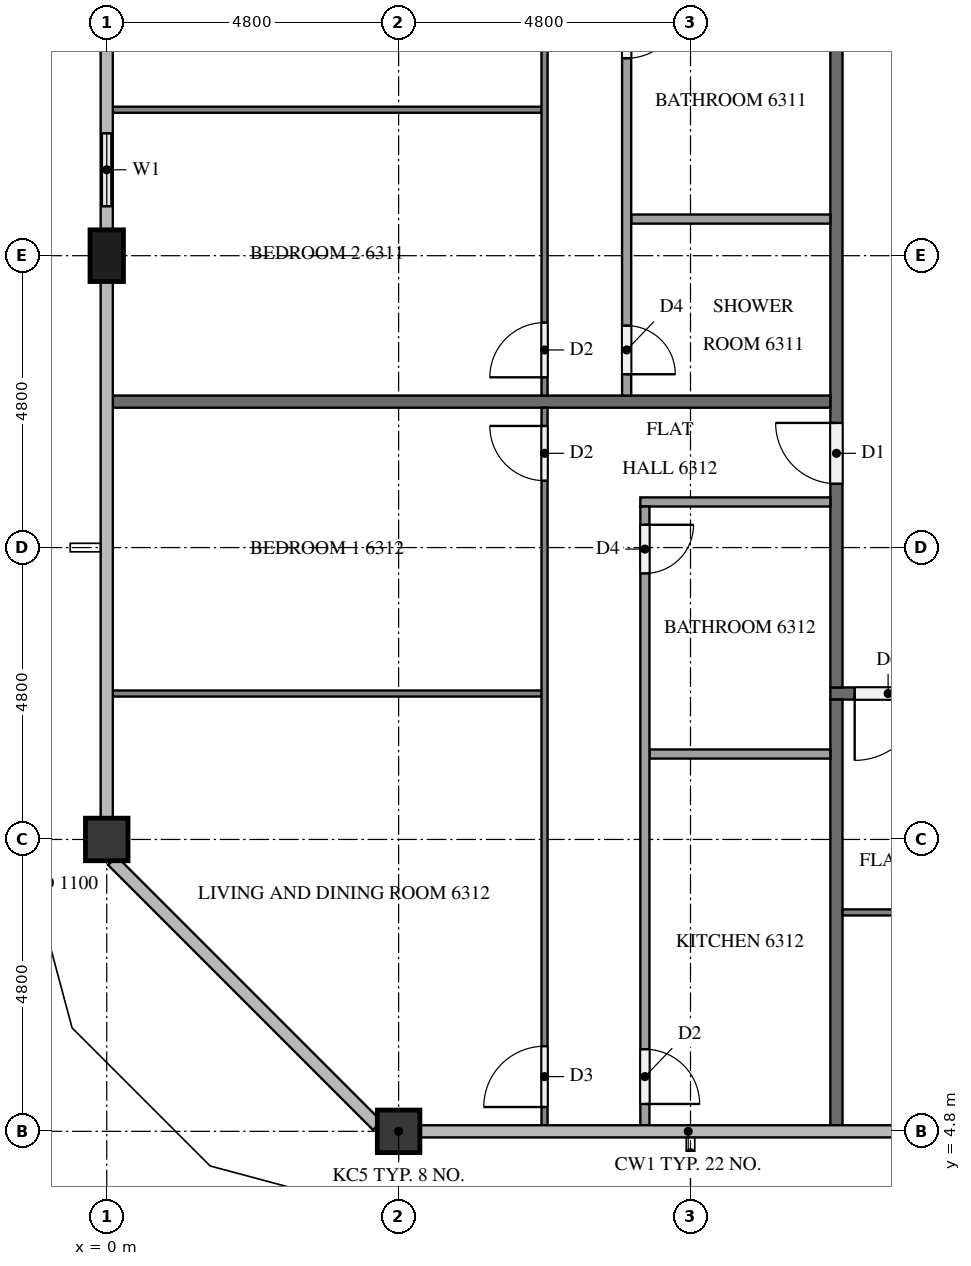
"""IFC4 building model, lengths in metres.
Left out: names, types, materials, properties, quantities, classifications, styles, units other than length and angle.
Written with IfcOpenShell. Run it as: python <this file> out.ifc"""

import sys

from ifc_helpers import new_model, si_unit, direction, frame, frame_2d, origin, origin_2d, place, context, subcontext, project, spatial, rectangle, extrude, element, fill, save


model = new_model("IFC4")
c1 = context("Model", 3, precision=1e-05, world=origin(), true_north=direction((0.0, 1.0)))
c2 = subcontext(c1, "Body", "Model", "MODEL_VIEW")
j1 = project(units=[si_unit("LENGTHUNIT", "METRE"), si_unit("PLANEANGLEUNIT", "RADIAN")], contexts=[c1])
p1 = place(None, origin())
s1 = spatial("IfcSite", under=j1, at=p1, CompositionType="ELEMENT")
p2 = place(p1, origin())
s2 = spatial("IfcBuilding", under=s1, at=p2, CompositionType="ELEMENT")
p3 = place(p2, frame((0.0, 0.0, 242.2)))
s3 = spatial("IfcBuildingStorey", under=s2, at=p3, CompositionType="ELEMENT", Elevation=242.2)
p4 = place(p3, frame((4.8, 4.8, 0.0), z_axis=(0.0, 0.0, 1.0), x_axis=(1.0, 0.0, 0.0)))
e1 = element("IfcColumn", 1, at=p4, inside=s3, PredefinedType="COLUMN", context=c2, shape_type="SweptSolid", body=[
    extrude(rectangle(XDim=0.7, YDim=0.7, at=origin_2d()), origin(), (0.0, 0.0, 1.0), 3.2),
])
p5 = place(p3, frame((0.0, 19.2, 0.0), z_axis=(0.0, 0.0, 1.0), x_axis=(0.0, 1.0, 0.0)))
e2 = element("IfcColumn", 2, at=p5, inside=s3, PredefinedType="COLUMN", context=c2, shape_type="SweptSolid", body=[
    extrude(rectangle(XDim=0.85, YDim=0.55, at=origin_2d()), origin(), (0.0, 0.0, 1.0), 3.2),
])
p6 = place(p3, frame((0.0, 9.6, 0.0), z_axis=(0.0, 0.0, 1.0), x_axis=(1.0, 0.0, 0.0)))
e3 = element("IfcColumn", 3, at=p6, inside=s3, PredefinedType="COLUMN", context=c2, shape_type="SweptSolid", body=[
    extrude(rectangle(XDim=0.7, YDim=0.7, at=origin_2d()), origin(), (0.0, 0.0, 1.0), 3.2),
])
p7 = place(p3, frame((0.0, 21.6, 0.0), z_axis=(0.0, 0.0, 1.0), x_axis=(0.0, -1.0, 0.0)))
e4 = element("IfcWall", 4, at=p7, inside=s3, PredefinedType="SOLIDWALL", context=c2, shape_type="SweptSolid", body=[
    extrude(rectangle(XDim=1.975, YDim=0.15, at=frame_2d((0.988, 0.0))), origin(), (0.0, 0.0, 1.0), 3.2),
])
p8 = place(p7, frame((0.387, 0.0, 0.9)))
e5 = element("IfcOpeningElement", 5, at=p8, cuts=e4, PredefinedType="OPENING", context=c2, shape_type="SweptSolid", body=[
    extrude(rectangle(XDim=1.2, YDim=1.4, at=frame_2d((0.6, 0.7))), frame((0.0, 0.085, 0.0), z_axis=(0.0, -1.0, 0.0), x_axis=(1.0, 0.0, 0.0)), (0.0, 0.0, 1.0), 0.17),
])
p9 = place(p3, frame((50.5, 12.0, 0.0), z_axis=(0.0, 0.0, 1.0), x_axis=(-1.0, 0.0, 0.0)))
e6 = element("IfcWall", 6, at=p9, inside=s3, PredefinedType="PARTITIONING", context=c2, shape_type="SweptSolid", body=[
    extrude(rectangle(XDim=38.6, YDim=0.2, at=frame_2d((19.3, 0.0))), origin(), (0.0, 0.0, 1.0), 3.2),
])
p10 = place(p9, frame((37.1, 0.0, 0.0)))
e7 = element("IfcOpeningElement", 7, at=p10, cuts=e6, PredefinedType="OPENING", context=c2, shape_type="SweptSolid", body=[
    extrude(rectangle(XDim=1.1, YDim=2.1, at=frame_2d((0.55, 1.05))), frame((0.0, 0.11, 0.0), z_axis=(0.0, -1.0, 0.0), x_axis=(1.0, 0.0, 0.0)), (0.0, 0.0, 1.0), 0.22),
])
p11 = place(p9, frame((17.95, 0.0, 0.0)))
e8 = element("IfcOpeningElement", 8, at=p11, cuts=e6, PredefinedType="OPENING", context=c2, shape_type="SweptSolid", body=[
    extrude(rectangle(XDim=1.0, YDim=2.1, at=frame_2d((0.5, 1.05))), frame((0.0, 0.11, 0.0), z_axis=(0.0, -1.0, 0.0), x_axis=(1.0, 0.0, 0.0)), (0.0, 0.0, 1.0), 0.22),
])
p12 = place(p9, frame((8.35, 0.0, 0.0)))
e9 = element("IfcOpeningElement", 9, at=p12, cuts=e6, PredefinedType="OPENING", context=c2, shape_type="SweptSolid", body=[
    extrude(rectangle(XDim=1.0, YDim=2.1, at=frame_2d((0.5, 1.05))), frame((0.0, 0.11, 0.0), z_axis=(0.0, -1.0, 0.0), x_axis=(1.0, 0.0, 0.0)), (0.0, 0.0, 1.0), 0.22),
])
p13 = place(p3, frame((12.0, 12.1, 0.0), z_axis=(0.0, 0.0, 1.0), x_axis=(0.0, 1.0, 0.0)))
e10 = element("IfcWall", 10, at=p13, inside=s3, PredefinedType="PARTITIONING", context=c2, shape_type="SweptSolid", body=[
    extrude(rectangle(XDim=28.6, YDim=0.2, at=frame_2d((14.3, 0.0))), origin(), (0.0, 0.0, 1.0), 3.2),
])
p14 = place(p13, frame((27.35, 0.0, 0.0)))
e11 = element("IfcOpeningElement", 11, at=p14, cuts=e10, PredefinedType="OPENING", context=c2, shape_type="SweptSolid", body=[
    extrude(rectangle(XDim=1.0, YDim=2.1, at=frame_2d((0.5, 1.05))), frame((0.0, 0.11, 0.0), z_axis=(0.0, -1.0, 0.0), x_axis=(1.0, 0.0, 0.0)), (0.0, 0.0, 1.0), 0.22),
])
p15 = place(p13, frame((17.75, 0.0, 0.0)))
e12 = element("IfcOpeningElement", 12, at=p15, cuts=e10, PredefinedType="OPENING", context=c2, shape_type="SweptSolid", body=[
    extrude(rectangle(XDim=1.0, YDim=2.1, at=frame_2d((0.5, 1.05))), frame((0.0, 0.11, 0.0), z_axis=(0.0, -1.0, 0.0), x_axis=(1.0, 0.0, 0.0)), (0.0, 0.0, 1.0), 0.22),
])
p16 = place(p13, frame((3.35, 0.0, 0.0)))
e13 = element("IfcOpeningElement", 13, at=p16, cuts=e10, PredefinedType="OPENING", context=c2, shape_type="SweptSolid", body=[
    extrude(rectangle(XDim=1.0, YDim=2.1, at=frame_2d((0.5, 1.05))), frame((0.0, 0.11, 0.0), z_axis=(0.0, -1.0, 0.0), x_axis=(1.0, 0.0, 0.0)), (0.0, 0.0, 1.0), 0.22),
])
p17 = place(p3, frame((12.0, 4.9, 0.0), z_axis=(0.0, 0.0, 1.0), x_axis=(0.0, 1.0, 0.0)))
e14 = element("IfcWall", 14, at=p17, inside=s3, PredefinedType="PARTITIONING", context=c2, shape_type="SweptSolid", body=[
    extrude(rectangle(XDim=7.0, YDim=0.2, at=frame_2d((3.5, 0.0))), origin(), (0.0, 0.0, 1.0), 3.2),
])
p18 = place(p3, frame((0.1, 16.8, 0.0), z_axis=(0.0, 0.0, 1.0), x_axis=(1.0, 0.0, 0.0)))
e15 = element("IfcWall", 15, at=p18, inside=s3, PredefinedType="PARTITIONING", context=c2, shape_type="SweptSolid", body=[
    extrude(rectangle(XDim=11.8, YDim=0.2, at=frame_2d((5.9, 0.0))), origin(), (0.0, 0.0, 1.0), 3.2),
])
p19 = place(p3, frame((31.1, 8.4, 0.0), z_axis=(0.0, 0.0, 1.0), x_axis=(-1.0, 0.0, 0.0)))
e16 = element("IfcWall", 16, at=p19, inside=s3, PredefinedType="PARTITIONING", context=c2, shape_type="SweptSolid", body=[
    extrude(rectangle(XDim=19.0, YDim=0.1, at=frame_2d((9.5, 0.0))), origin(), (0.0, 0.0, 1.0), 3.2),
])
p20 = place(p19, frame((14.65, 0.0, 0.0)))
e17 = element("IfcOpeningElement", 17, at=p20, cuts=e16, PredefinedType="OPENING", context=c2, shape_type="SweptSolid", body=[
    extrude(rectangle(XDim=0.9, YDim=2.1, at=frame_2d((0.45, 1.05))), frame((0.0, 0.06, 0.0), z_axis=(0.0, -1.0, 0.0), x_axis=(1.0, 0.0, 0.0)), (0.0, 0.0, 1.0), 0.12),
])
p21 = place(p19, frame((12.95, 0.0, 0.0)))
e18 = element("IfcOpeningElement", 18, at=p21, cuts=e16, PredefinedType="OPENING", context=c2, shape_type="SweptSolid", body=[
    extrude(rectangle(XDim=1.0, YDim=2.1, at=frame_2d((0.5, 1.05))), frame((0.0, 0.06, 0.0), z_axis=(0.0, -1.0, 0.0), x_axis=(1.0, 0.0, 0.0)), (0.0, 0.0, 1.0), 0.12),
])
p22 = place(p19, frame((5.05, 0.0, 0.0)))
e19 = element("IfcOpeningElement", 19, at=p22, cuts=e16, PredefinedType="OPENING", context=c2, shape_type="SweptSolid", body=[
    extrude(rectangle(XDim=0.9, YDim=2.1, at=frame_2d((0.45, 1.05))), frame((0.0, 0.06, 0.0), z_axis=(0.0, -1.0, 0.0), x_axis=(1.0, 0.0, 0.0)), (0.0, 0.0, 1.0), 0.12),
])
p23 = place(p19, frame((3.45, 0.0, 0.0)))
e20 = element("IfcOpeningElement", 20, at=p23, cuts=e16, PredefinedType="OPENING", context=c2, shape_type="SweptSolid", body=[
    extrude(rectangle(XDim=0.9, YDim=2.1, at=frame_2d((0.45, 1.05))), frame((0.0, 0.06, 0.0), z_axis=(0.0, -1.0, 0.0), x_axis=(1.0, 0.0, 0.0)), (0.0, 0.0, 1.0), 0.12),
])
p24 = place(p3, frame((7.15, 21.6, 0.0), z_axis=(0.0, 0.0, 1.0), x_axis=(-1.0, 0.0, 0.0)))
e21 = element("IfcWall", 21, at=p24, inside=s3, PredefinedType="PARTITIONING", context=c2, shape_type="SweptSolid", body=[
    extrude(rectangle(XDim=7.05, YDim=0.1, at=frame_2d((3.525, 0.0))), origin(), (0.0, 0.0, 1.0), 3.2),
])
p25 = place(p3, frame((7.2, 16.9, 0.0), z_axis=(0.0, 0.0, 1.0), x_axis=(0.0, 1.0, 0.0)))
e22 = element("IfcWall", 22, at=p25, inside=s3, PredefinedType="PARTITIONING", context=c2, shape_type="SweptSolid", body=[
    extrude(rectangle(XDim=14.2, YDim=0.1, at=frame_2d((7.1, 0.0))), origin(), (0.0, 0.0, 1.0), 3.2),
])
p26 = place(p25, frame((9.85, 0.0, 0.0)))
e23 = element("IfcOpeningElement", 23, at=p26, cuts=e22, PredefinedType="OPENING", context=c2, shape_type="SweptSolid", body=[
    extrude(rectangle(XDim=1.0, YDim=2.1, at=frame_2d((0.5, 1.05))), frame((0.0, 0.06, 0.0), z_axis=(0.0, -1.0, 0.0), x_axis=(1.0, 0.0, 0.0)), (0.0, 0.0, 1.0), 0.12),
])
p27 = place(p25, frame((8.25, 0.0, 0.0)))
e24 = element("IfcOpeningElement", 24, at=p27, cuts=e22, PredefinedType="OPENING", context=c2, shape_type="SweptSolid", body=[
    extrude(rectangle(XDim=0.9, YDim=2.1, at=frame_2d((0.45, 1.05))), frame((0.0, 0.06, 0.0), z_axis=(0.0, -1.0, 0.0), x_axis=(1.0, 0.0, 0.0)), (0.0, 0.0, 1.0), 0.12),
])
p28 = place(p25, frame((0.3, 0.0, 0.0)))
e25 = element("IfcOpeningElement", 25, at=p28, cuts=e22, PredefinedType="OPENING", context=c2, shape_type="SweptSolid", body=[
    extrude(rectangle(XDim=0.9, YDim=2.1, at=frame_2d((0.45, 1.05))), frame((0.0, 0.06, 0.0), z_axis=(0.0, -1.0, 0.0), x_axis=(1.0, 0.0, 0.0)), (0.0, 0.0, 1.0), 0.12),
])
p29 = place(p3, frame((11.9, 19.802, 0.0), z_axis=(0.0, 0.0, 1.0), x_axis=(-1.0, 0.0, 0.0)))
e26 = element("IfcWall", 26, at=p29, inside=s3, PredefinedType="PARTITIONING", context=c2, shape_type="SweptSolid", body=[
    extrude(rectangle(XDim=3.275, YDim=0.15, at=frame_2d((1.637, 0.0))), origin(), (0.0, 0.0, 1.0), 3.2),
])
p30 = place(p3, frame((8.55, 29.475, 0.0), z_axis=(0.0, 0.0, 1.0), x_axis=(0.0, -1.0, 0.0)))
e27 = element("IfcWall", 27, at=p30, inside=s3, PredefinedType="PARTITIONING", context=c2, shape_type="SweptSolid", body=[
    extrude(rectangle(XDim=12.575, YDim=0.15, at=frame_2d((6.288, 0.0))), origin(), (0.0, 0.0, 1.0), 3.2),
])
p31 = place(p30, frame((4.579, 0.0, 0.0)))
e28 = element("IfcOpeningElement", 28, at=p31, cuts=e27, PredefinedType="OPENING", context=c2, shape_type="SweptSolid", body=[
    extrude(rectangle(XDim=0.9, YDim=2.1, at=frame_2d((0.45, 1.05))), frame((0.0, 0.085, 0.0), z_axis=(0.0, -1.0, 0.0), x_axis=(1.0, 0.0, 0.0)), (0.0, 0.0, 1.0), 0.17),
])
p32 = place(p30, frame((6.129, 0.0, 0.0)))
e29 = element("IfcOpeningElement", 29, at=p32, cuts=e27, PredefinedType="OPENING", context=c2, shape_type="SweptSolid", body=[
    extrude(rectangle(XDim=0.9, YDim=2.1, at=frame_2d((0.45, 1.05))), frame((0.0, 0.085, 0.0), z_axis=(0.0, -1.0, 0.0), x_axis=(1.0, 0.0, 0.0)), (0.0, 0.0, 1.0), 0.17),
])
p33 = place(p30, frame((11.425, 0.0, 0.0)))
e30 = element("IfcOpeningElement", 30, at=p33, cuts=e27, PredefinedType="OPENING", context=c2, shape_type="SweptSolid", body=[
    extrude(rectangle(XDim=0.8, YDim=2.1, at=frame_2d((0.4, 1.05))), frame((0.0, 0.085, 0.0), z_axis=(0.0, -1.0, 0.0), x_axis=(1.0, 0.0, 0.0)), (0.0, 0.0, 1.0), 0.17),
])
p34 = place(p3, frame((7.15, 12.0, 0.0), z_axis=(0.0, 0.0, 1.0), x_axis=(-1.0, 0.0, 0.0)))
e31 = element("IfcWall", 31, at=p34, inside=s3, PredefinedType="PARTITIONING", context=c2, shape_type="SweptSolid", body=[
    extrude(rectangle(XDim=7.05, YDim=0.1, at=frame_2d((3.525, 0.0))), origin(), (0.0, 0.0, 1.0), 3.2),
])
p35 = place(p3, frame((7.2, 4.9, 0.0), z_axis=(0.0, 0.0, 1.0), x_axis=(0.0, 1.0, 0.0)))
e32 = element("IfcWall", 32, at=p35, inside=s3, PredefinedType="PARTITIONING", context=c2, shape_type="SweptSolid", body=[
    extrude(rectangle(XDim=11.8, YDim=0.1, at=frame_2d((5.9, 0.0))), origin(), (0.0, 0.0, 1.0), 3.2),
])
p36 = place(p35, frame((10.6, 0.0, 0.0)))
e33 = element("IfcOpeningElement", 33, at=p36, cuts=e32, PredefinedType="OPENING", context=c2, shape_type="SweptSolid", body=[
    extrude(rectangle(XDim=0.9, YDim=2.1, at=frame_2d((0.45, 1.05))), frame((0.0, 0.06, 0.0), z_axis=(0.0, -1.0, 0.0), x_axis=(1.0, 0.0, 0.0)), (0.0, 0.0, 1.0), 0.12),
])
p37 = place(p35, frame((0.3, 0.0, 0.0)))
e34 = element("IfcOpeningElement", 34, at=p37, cuts=e32, PredefinedType="OPENING", context=c2, shape_type="SweptSolid", body=[
    extrude(rectangle(XDim=1.0, YDim=2.1, at=frame_2d((0.5, 1.05))), frame((0.0, 0.06, 0.0), z_axis=(0.0, -1.0, 0.0), x_axis=(1.0, 0.0, 0.0)), (0.0, 0.0, 1.0), 0.12),
])
p38 = place(p3, frame((11.9, 11.005, 0.0), z_axis=(0.0, 0.0, 1.0), x_axis=(-1.0, 0.0, 0.0)))
e35 = element("IfcWall", 35, at=p38, inside=s3, PredefinedType="PARTITIONING", context=c2, shape_type="SweptSolid", body=[
    extrude(rectangle(XDim=2.975, YDim=0.15, at=frame_2d((1.487, 0.0))), origin(), (0.0, 0.0, 1.0), 3.2),
])
p39 = place(p3, frame((11.9, 15.15, 0.0), z_axis=(0.0, 0.0, 1.0), x_axis=(-1.0, 0.0, 0.0)))
e36 = element("IfcWall", 36, at=p39, inside=s3, PredefinedType="PARTITIONING", context=c2, shape_type="SweptSolid", body=[
    extrude(rectangle(XDim=3.125, YDim=0.15, at=frame_2d((1.562, 0.0))), origin(), (0.0, 0.0, 1.0), 3.2),
])
p40 = place(p3, frame((8.85, 15.075, 0.0), z_axis=(0.0, 0.0, 1.0), x_axis=(0.0, -1.0, 0.0)))
e37 = element("IfcWall", 37, at=p40, inside=s3, PredefinedType="PARTITIONING", context=c2, shape_type="SweptSolid", body=[
    extrude(rectangle(XDim=10.175, YDim=0.15, at=frame_2d((5.087, 0.0))), origin(), (0.0, 0.0, 1.0), 3.2),
])
p41 = place(p40, frame((0.3, 0.0, 0.0)))
e38 = element("IfcOpeningElement", 38, at=p41, cuts=e37, PredefinedType="OPENING", context=c2, shape_type="SweptSolid", body=[
    extrude(rectangle(XDim=0.8, YDim=2.1, at=frame_2d((0.4, 1.05))), frame((0.0, 0.085, 0.0), z_axis=(0.0, -1.0, 0.0), x_axis=(1.0, 0.0, 0.0)), (0.0, 0.0, 1.0), 0.17),
])
p42 = place(p40, frame((8.925, 0.0, 0.0)))
e39 = element("IfcOpeningElement", 39, at=p42, cuts=e37, PredefinedType="OPENING", context=c2, shape_type="SweptSolid", body=[
    extrude(rectangle(XDim=0.9, YDim=2.1, at=frame_2d((0.45, 1.05))), frame((0.0, 0.085, 0.0), z_axis=(0.0, -1.0, 0.0), x_axis=(1.0, 0.0, 0.0)), (0.0, 0.0, 1.0), 0.17),
])
p43 = place(p8, origin())
e40 = element("IfcWindow", 40, at=p43, inside=s3, PartitioningType="SINGLE_PANEL", PredefinedType="WINDOW", context=c2, shape_type="SweptSolid", body=[
    extrude(rectangle(XDim=1.2, YDim=1.4, at=frame_2d((0.6, 0.7))), frame((0.0, 0.03, 0.0), z_axis=(0.0, -1.0, 0.0), x_axis=(1.0, 0.0, 0.0)), (0.0, 0.0, 1.0), 0.06),
])
fill(e5, e40)
p44 = place(p10, origin())
e41 = element("IfcDoor", 41, at=p44, inside=s3, OperationType="SINGLE_SWING_RIGHT", PredefinedType="DOOR", context=c2, shape_type="SweptSolid", body=[
    extrude(rectangle(XDim=1.1, YDim=2.1, at=frame_2d((0.55, 1.05))), frame((0.0, 0.025, 0.0), z_axis=(0.0, -1.0, 0.0), x_axis=(1.0, 0.0, 0.0)), (0.0, 0.0, 1.0), 0.05),
])
fill(e7, e41)
p45 = place(p16, origin())
e42 = element("IfcDoor", 42, at=p45, inside=s3, OperationType="SINGLE_SWING_RIGHT", PredefinedType="DOOR", context=c2, shape_type="SweptSolid", body=[
    extrude(rectangle(XDim=1.0, YDim=2.1, at=frame_2d((0.5, 1.05))), frame((0.0, 0.025, 0.0), z_axis=(0.0, -1.0, 0.0), x_axis=(1.0, 0.0, 0.0)), (0.0, 0.0, 1.0), 0.05),
])
fill(e13, e42)
p46 = place(p28, origin())
e43 = element("IfcDoor", 43, at=p46, inside=s3, OperationType="SINGLE_SWING_LEFT", PredefinedType="DOOR", context=c2, shape_type="SweptSolid", body=[
    extrude(rectangle(XDim=0.9, YDim=2.1, at=frame_2d((0.45, 1.05))), frame((0.0, 0.025, 0.0), z_axis=(0.0, -1.0, 0.0), x_axis=(1.0, 0.0, 0.0)), (0.0, 0.0, 1.0), 0.05),
])
fill(e25, e43)
p47 = place(p32, origin())
e44 = element("IfcDoor", 44, at=p47, inside=s3, OperationType="SINGLE_SWING_LEFT", PredefinedType="DOOR", context=c2, shape_type="SweptSolid", body=[
    extrude(rectangle(XDim=0.9, YDim=2.1, at=frame_2d((0.45, 1.05))), frame((0.0, 0.025, 0.0), z_axis=(0.0, -1.0, 0.0), x_axis=(1.0, 0.0, 0.0)), (0.0, 0.0, 1.0), 0.05),
])
fill(e29, e44)
p48 = place(p33, origin())
e45 = element("IfcDoor", 45, at=p48, inside=s3, OperationType="SINGLE_SWING_RIGHT", PredefinedType="DOOR", context=c2, shape_type="SweptSolid", body=[
    extrude(rectangle(XDim=0.8, YDim=2.1, at=frame_2d((0.4, 1.05))), frame((0.0, 0.025, 0.0), z_axis=(0.0, -1.0, 0.0), x_axis=(1.0, 0.0, 0.0)), (0.0, 0.0, 1.0), 0.05),
])
fill(e30, e45)
p49 = place(p36, origin())
e46 = element("IfcDoor", 46, at=p49, inside=s3, OperationType="SINGLE_SWING_RIGHT", PredefinedType="DOOR", context=c2, shape_type="SweptSolid", body=[
    extrude(rectangle(XDim=0.9, YDim=2.1, at=frame_2d((0.45, 1.05))), frame((0.0, 0.025, 0.0), z_axis=(0.0, -1.0, 0.0), x_axis=(1.0, 0.0, 0.0)), (0.0, 0.0, 1.0), 0.05),
])
fill(e33, e46)
p50 = place(p37, origin())
e47 = element("IfcDoor", 47, at=p50, inside=s3, OperationType="SINGLE_SWING_LEFT", PredefinedType="DOOR", context=c2, shape_type="SweptSolid", body=[
    extrude(rectangle(XDim=1.0, YDim=2.1, at=frame_2d((0.5, 1.05))), frame((0.0, 0.025, 0.0), z_axis=(0.0, -1.0, 0.0), x_axis=(1.0, 0.0, 0.0)), (0.0, 0.0, 1.0), 0.05),
])
fill(e34, e47)
p51 = place(p41, origin())
e48 = element("IfcDoor", 48, at=p51, inside=s3, OperationType="SINGLE_SWING_LEFT", PredefinedType="DOOR", context=c2, shape_type="SweptSolid", body=[
    extrude(rectangle(XDim=0.8, YDim=2.1, at=frame_2d((0.4, 1.05))), frame((0.0, 0.025, 0.0), z_axis=(0.0, -1.0, 0.0), x_axis=(1.0, 0.0, 0.0)), (0.0, 0.0, 1.0), 0.05),
])
fill(e38, e48)
p52 = place(p42, origin())
e49 = element("IfcDoor", 49, at=p52, inside=s3, OperationType="SINGLE_SWING_RIGHT", PredefinedType="DOOR", context=c2, shape_type="SweptSolid", body=[
    extrude(rectangle(XDim=0.9, YDim=2.1, at=frame_2d((0.45, 1.05))), frame((0.0, 0.025, 0.0), z_axis=(0.0, -1.0, 0.0), x_axis=(1.0, 0.0, 0.0)), (0.0, 0.0, 1.0), 0.05),
])
fill(e39, e49)
save(model, sys.argv[1])
